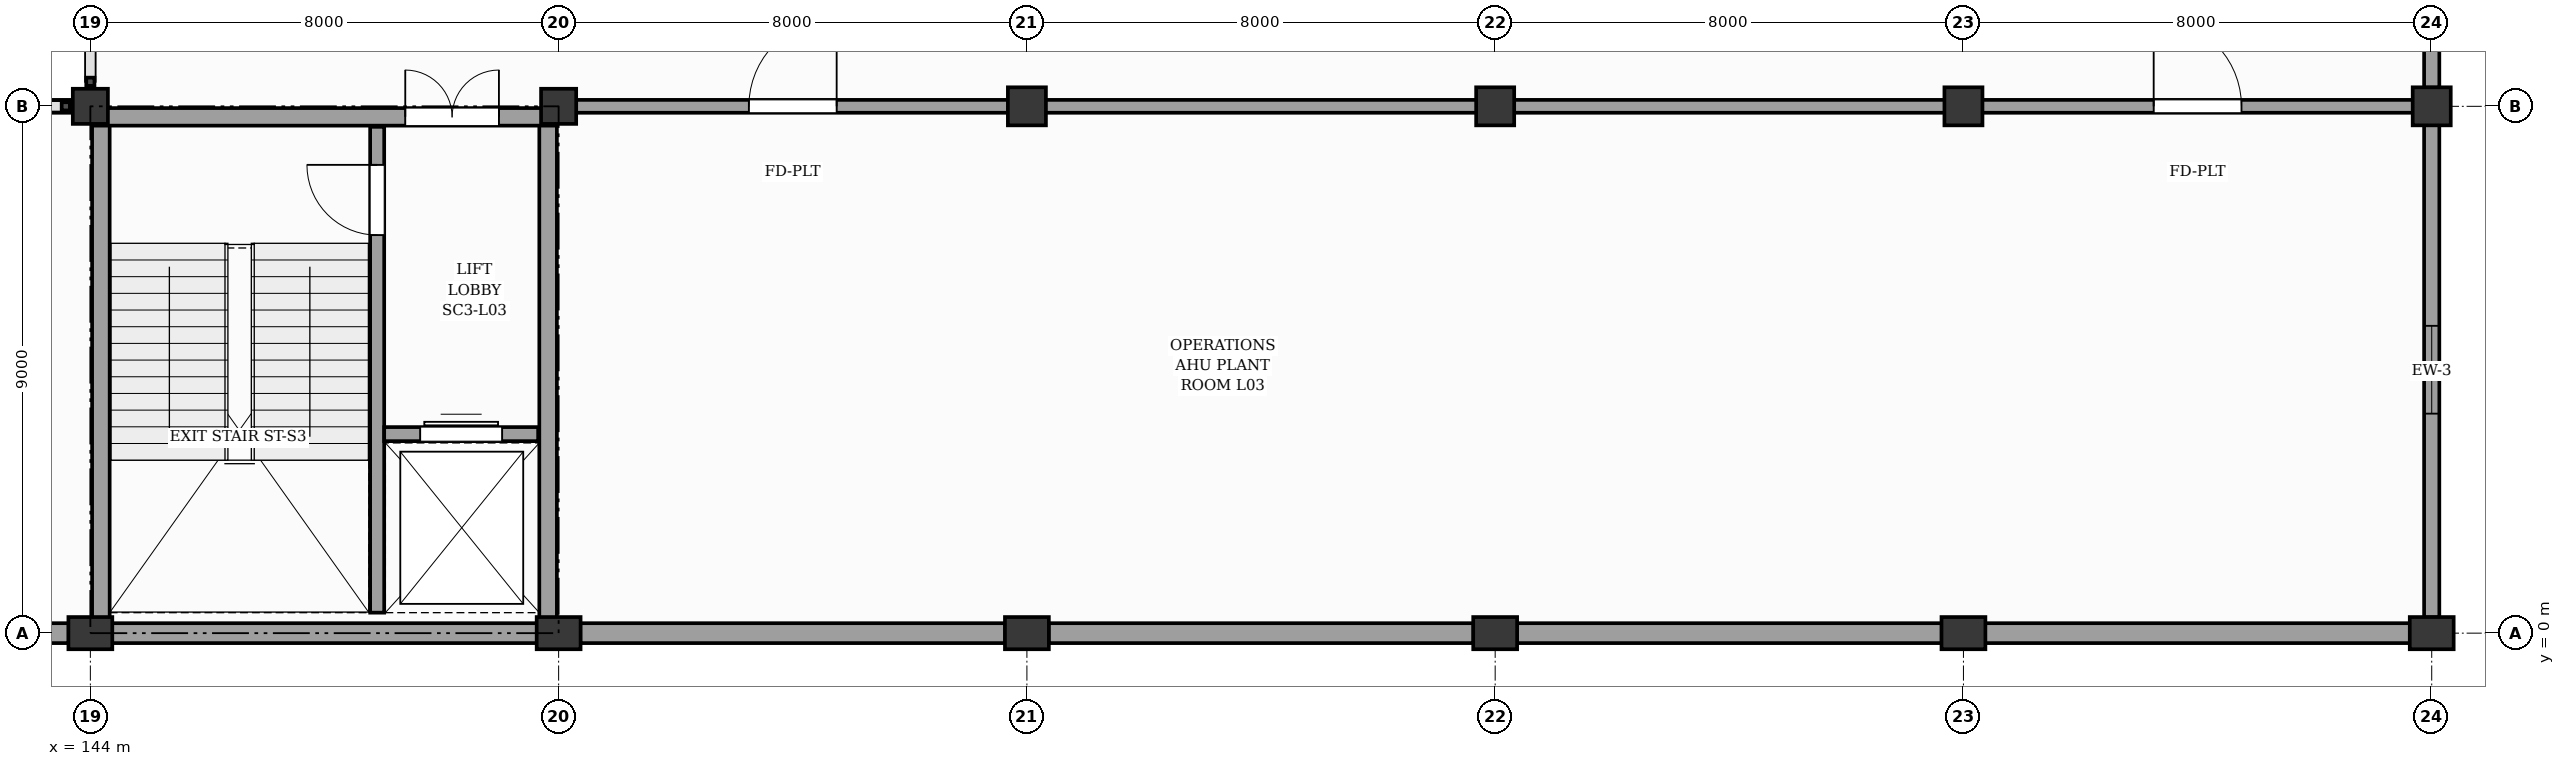
"""IFC4 building model, lengths in metres.
Left out: names, types, materials, properties, quantities, classifications, styles, units other than length and angle.
Written with IfcOpenShell. Run it as: python <this file> out.ifc"""

import sys

from ifc_helpers import new_model, si_unit, direction, frame, frame_2d, origin, origin_2d, place, context, subcontext, project, spatial, rectangle, extrude, element, fill, save


model = new_model("IFC4")
c1 = context("Model", 3, precision=1e-05, world=origin(), true_north=direction((0.0, 1.0)))
c2 = subcontext(c1, "Body", "Model", "MODEL_VIEW")
j1 = project(units=[si_unit("LENGTHUNIT", "METRE"), si_unit("PLANEANGLEUNIT", "RADIAN")], contexts=[c1])
p1 = place(None, origin())
s1 = spatial("IfcSite", under=j1, at=p1, CompositionType="ELEMENT")
p2 = place(p1, origin())
s2 = spatial("IfcBuilding", under=s1, at=p2, CompositionType="ELEMENT")
p3 = place(p2, frame((0.0, 0.0, 16.2)))
s3 = spatial("IfcBuildingStorey", under=s2, at=p3, CompositionType="ELEMENT", Elevation=16.2)
p4 = place(p3, frame((144.0, 0.0, 0.0), z_axis=(0.0, 0.0, 1.0), x_axis=(1.0, 0.0, 0.0)))
e1 = element("IfcColumn", 1, at=p4, inside=s3, PredefinedType="PILASTER", context=c2, shape_type="SweptSolid", body=[
    extrude(rectangle(XDim=0.75, YDim=0.55, at=origin_2d()), origin(), (0.0, 0.0, 1.0), 4.2),
])
p5 = place(p3, frame((144.0, 9.0, 0.0), z_axis=(0.0, 0.0, 1.0), x_axis=(1.0, 0.0, 0.0)))
e2 = element("IfcColumn", 2, at=p5, inside=s3, PredefinedType="COLUMN", context=c2, shape_type="SweptSolid", body=[
    extrude(rectangle(XDim=0.6, YDim=0.6, at=origin_2d()), origin(), (0.0, 0.0, 1.0), 4.2),
])
p6 = place(p3, frame((152.0, 0.0, 0.0), z_axis=(0.0, 0.0, 1.0), x_axis=(1.0, 0.0, 0.0)))
e3 = element("IfcColumn", 3, at=p6, inside=s3, PredefinedType="PILASTER", context=c2, shape_type="SweptSolid", body=[
    extrude(rectangle(XDim=0.75, YDim=0.55, at=origin_2d()), origin(), (0.0, 0.0, 1.0), 4.2),
])
p7 = place(p3, frame((152.0, 9.0, 0.0), z_axis=(0.0, 0.0, 1.0), x_axis=(1.0, 0.0, 0.0)))
e4 = element("IfcColumn", 4, at=p7, inside=s3, PredefinedType="COLUMN", context=c2, shape_type="SweptSolid", body=[
    extrude(rectangle(XDim=0.6, YDim=0.6, at=origin_2d()), origin(), (0.0, 0.0, 1.0), 4.2),
])
p8 = place(p3, frame((160.0, 0.0, 0.0), z_axis=(0.0, 0.0, 1.0), x_axis=(1.0, 0.0, 0.0)))
e5 = element("IfcColumn", 5, at=p8, inside=s3, PredefinedType="PILASTER", context=c2, shape_type="SweptSolid", body=[
    extrude(rectangle(XDim=0.75, YDim=0.55, at=origin_2d()), origin(), (0.0, 0.0, 1.0), 4.2),
])
p9 = place(p3, frame((160.0, 9.0, 0.0), z_axis=(0.0, 0.0, 1.0), x_axis=(1.0, 0.0, 0.0)))
e6 = element("IfcColumn", 6, at=p9, inside=s3, PredefinedType="COLUMN", context=c2, shape_type="SweptSolid", body=[
    extrude(rectangle(XDim=0.65, YDim=0.65, at=origin_2d()), origin(), (0.0, 0.0, 1.0), 4.2),
])
p10 = place(p3, frame((168.0, 0.0, 0.0), z_axis=(0.0, 0.0, 1.0), x_axis=(1.0, 0.0, 0.0)))
e7 = element("IfcColumn", 7, at=p10, inside=s3, PredefinedType="PILASTER", context=c2, shape_type="SweptSolid", body=[
    extrude(rectangle(XDim=0.75, YDim=0.55, at=origin_2d()), origin(), (0.0, 0.0, 1.0), 4.2),
])
p11 = place(p3, frame((168.0, 9.0, 0.0), z_axis=(0.0, 0.0, 1.0), x_axis=(1.0, 0.0, 0.0)))
e8 = element("IfcColumn", 8, at=p11, inside=s3, PredefinedType="COLUMN", context=c2, shape_type="SweptSolid", body=[
    extrude(rectangle(XDim=0.65, YDim=0.65, at=origin_2d()), origin(), (0.0, 0.0, 1.0), 4.2),
])
p12 = place(p3, frame((176.0, 0.0, 0.0), z_axis=(0.0, 0.0, 1.0), x_axis=(1.0, 0.0, 0.0)))
e9 = element("IfcColumn", 9, at=p12, inside=s3, PredefinedType="PILASTER", context=c2, shape_type="SweptSolid", body=[
    extrude(rectangle(XDim=0.75, YDim=0.55, at=origin_2d()), origin(), (0.0, 0.0, 1.0), 4.2),
])
p13 = place(p3, frame((176.0, 9.0, 0.0), z_axis=(0.0, 0.0, 1.0), x_axis=(1.0, 0.0, 0.0)))
e10 = element("IfcColumn", 10, at=p13, inside=s3, PredefinedType="COLUMN", context=c2, shape_type="SweptSolid", body=[
    extrude(rectangle(XDim=0.65, YDim=0.65, at=origin_2d()), origin(), (0.0, 0.0, 1.0), 4.2),
])
p14 = place(p3, frame((184.0, 0.0, 0.0), z_axis=(0.0, 0.0, 1.0), x_axis=(1.0, 0.0, 0.0)))
e11 = element("IfcColumn", 11, at=p14, inside=s3, PredefinedType="PILASTER", context=c2, shape_type="SweptSolid", body=[
    extrude(rectangle(XDim=0.75, YDim=0.55, at=origin_2d()), origin(), (0.0, 0.0, 1.0), 4.2),
])
p15 = place(p3, frame((184.0, 9.0, 0.0), z_axis=(0.0, 0.0, 1.0), x_axis=(1.0, 0.0, 0.0)))
e12 = element("IfcColumn", 12, at=p15, inside=s3, PredefinedType="COLUMN", context=c2, shape_type="SweptSolid", body=[
    extrude(rectangle(XDim=0.65, YDim=0.65, at=origin_2d()), origin(), (0.0, 0.0, 1.0), 4.2),
])
for number, where, z_axis, x_axis in (
    (13, (136.37, 0.0, 0.0), (0.0, 0.0, 1.0), (1.0, 0.0, 0.0)),
    (14, (144.37, 0.0, 0.0), (0.0, 0.0, 1.0), (1.0, 0.0, 0.0)),
    (15, (152.37, 0.0, 0.0), (0.0, 0.0, 1.0), (1.0, 0.0, 0.0)),
    (16, (160.37, 0.0, 0.0), (0.0, 0.0, 1.0), (1.0, 0.0, 0.0)),
    (17, (168.37, 0.0, 0.0), (0.0, 0.0, 1.0), (1.0, 0.0, 0.0)),
    (18, (176.37, 0.0, 0.0), (0.0, 0.0, 1.0), (1.0, 0.0, 0.0)),
):
    element("IfcWall", number, at=place(p3, frame(where, z_axis=z_axis, x_axis=x_axis)), inside=s3, PredefinedType="SOLIDWALL", context=c2, shape_type="SweptSolid", body=[
        extrude(rectangle(XDim=7.26, YDim=0.34, at=frame_2d((3.63, 0.0))), origin(), (0.0, 0.0, 1.0), 3.24),
    ])
p16 = place(p3, frame((184.0, 0.27, 0.0), z_axis=(0.0, 0.0, 1.0), x_axis=(0.0, 1.0, 0.0)))
e19 = element("IfcWall", 19, at=p16, inside=s3, PredefinedType="SOLIDWALL", context=c2, shape_type="SweptSolid", body=[
    extrude(rectangle(XDim=8.41, YDim=0.26, at=frame_2d((4.205, 0.0))), origin(), (0.0, 0.0, 1.0), 3.13),
])
p17 = place(p16, frame((3.48, 0.0, 0.95)))
e20 = element("IfcOpeningElement", 20, at=p17, cuts=e19, PredefinedType="OPENING", context=c2, shape_type="SweptSolid", body=[
    extrude(rectangle(XDim=1.5, YDim=1.9, at=frame_2d((0.75, 0.95))), frame((0.0, 0.14, 0.0), z_axis=(0.0, -1.0, 0.0), x_axis=(1.0, 0.0, 0.0)), (0.0, 0.0, 1.0), 0.28),
])
p18 = place(p3, frame((184.0, 9.32, 0.0), z_axis=(0.0, 0.0, 1.0), x_axis=(0.0, 1.0, 0.0)))
e21 = element("IfcWall", 21, at=p18, inside=s3, PredefinedType="SOLIDWALL", context=c2, shape_type="SweptSolid", body=[
    extrude(rectangle(XDim=8.36, YDim=0.26, at=frame_2d((4.18, 0.0))), origin(), (0.0, 0.0, 1.0), 3.13),
])
p19 = place(p18, frame((3.43, 0.0, 0.95)))
e22 = element("IfcOpeningElement", 22, at=p19, cuts=e21, PredefinedType="OPENING", context=c2, shape_type="SweptSolid", body=[
    extrude(rectangle(XDim=1.5, YDim=1.9, at=frame_2d((0.75, 0.95))), frame((0.0, 0.14, 0.0), z_axis=(0.0, -1.0, 0.0), x_axis=(1.0, 0.0, 0.0)), (0.0, 0.0, 1.0), 0.28),
])
p20 = place(p3, frame((148.9, 0.35, 0.0), z_axis=(0.0, 0.0, 1.0), x_axis=(0.0, 1.0, 0.0)))
e23 = element("IfcWall", 23, at=p20, inside=s3, PredefinedType="SHEAR", context=c2, shape_type="SweptSolid", body=[
    extrude(rectangle(XDim=8.3, YDim=0.24, at=frame_2d((4.15, 0.0))), origin(), (0.0, 0.0, 1.0), 3.92),
])
p21 = place(p20, frame((6.45, 0.0, 0.0)))
e24 = element("IfcOpeningElement", 24, at=p21, cuts=e23, PredefinedType="OPENING", context=c2, shape_type="SweptSolid", body=[
    extrude(rectangle(XDim=1.2, YDim=2.15, at=frame_2d((0.6, 1.075))), frame((0.0, 0.13, 0.0), z_axis=(0.0, -1.0, 0.0), x_axis=(1.0, 0.0, 0.0)), (0.0, 0.0, 1.0), 0.26),
])
p22 = place(p3, frame((149.02, 3.4, 0.0), z_axis=(0.0, 0.0, 1.0), x_axis=(1.0, 0.0, 0.0)))
e25 = element("IfcWall", 25, at=p22, inside=s3, PredefinedType="SHEAR", context=c2, shape_type="SweptSolid", body=[
    extrude(rectangle(XDim=2.63, YDim=0.24, at=frame_2d((1.315, 0.0))), origin(), (0.0, 0.0, 1.0), 3.92),
])
p23 = place(p22, frame((0.615, 0.0, 0.0)))
e26 = element("IfcOpeningElement", 26, at=p23, cuts=e25, PredefinedType="OPENING", context=c2, shape_type="SweptSolid", body=[
    extrude(rectangle(XDim=1.4, YDim=2.15, at=frame_2d((0.7, 1.075))), frame((0.0, 0.13, 0.0), z_axis=(0.0, -1.0, 0.0), x_axis=(1.0, 0.0, 0.0)), (0.0, 0.0, 1.0), 0.26),
])
for number, where, z_axis, x_axis in (
    (27, (144.18, 0.18, 0.0), (0.0, 0.0, 1.0), (0.0, 1.0, 0.0)),
    (28, (151.82, 0.18, 0.0), (0.0, 0.0, 1.0), (0.0, 1.0, 0.0)),
):
    element("IfcWall", number, at=place(p3, frame(where, z_axis=z_axis, x_axis=x_axis)), inside=s3, PredefinedType="SHEAR", context=c2, shape_type="SweptSolid", body=[
        extrude(rectangle(XDim=8.64, YDim=0.3, at=frame_2d((4.32, 0.0))), origin(), (0.0, 0.0, 1.0), 3.92),
    ])
p24 = place(p3, frame((144.03, 8.82, 0.0), z_axis=(0.0, 0.0, 1.0), x_axis=(1.0, 0.0, 0.0)))
e29 = element("IfcWall", 29, at=p24, inside=s3, PredefinedType="SHEAR", context=c2, shape_type="SweptSolid", body=[
    extrude(rectangle(XDim=7.94, YDim=0.3, at=frame_2d((3.97, 0.0))), origin(), (0.0, 0.0, 1.0), 3.92),
])
p25 = place(p24, frame((5.35, 0.0, 0.0)))
e30 = element("IfcOpeningElement", 30, at=p25, cuts=e29, PredefinedType="OPENING", context=c2, shape_type="SweptSolid", body=[
    extrude(rectangle(XDim=1.6, YDim=2.15, at=frame_2d((0.8, 1.075))), frame((0.0, 0.16, 0.0), z_axis=(0.0, -1.0, 0.0), x_axis=(1.0, 0.0, 0.0)), (0.0, 0.0, 1.0), 0.32),
])
p26 = place(p3, frame((136.3, 9.0, 0.0), z_axis=(0.0, 0.0, 1.0), x_axis=(1.0, 0.0, 0.0)))
e31 = element("IfcWall", 31, at=p26, inside=s3, PredefinedType="SOLIDWALL", context=c2, shape_type="SweptSolid", body=[
    extrude(rectangle(XDim=7.4, YDim=0.22, at=frame_2d((3.7, 0.0))), origin(), (0.0, 0.0, 1.0), 3.1),
])
p27 = place(p3, frame((152.3, 9.0, 0.0), z_axis=(0.0, 0.0, 1.0), x_axis=(1.0, 0.0, 0.0)))
e32 = element("IfcWall", 32, at=p27, inside=s3, PredefinedType="SOLIDWALL", context=c2, shape_type="SweptSolid", body=[
    extrude(rectangle(XDim=7.4, YDim=0.22, at=frame_2d((3.7, 0.0))), origin(), (0.0, 0.0, 1.0), 3.1),
])
p28 = place(p27, frame((2.95, 0.0, 0.0)))
e33 = element("IfcOpeningElement", 33, at=p28, cuts=e32, PredefinedType="OPENING", context=c2, shape_type="SweptSolid", body=[
    extrude(rectangle(XDim=1.5, YDim=2.2, at=frame_2d((0.75, 1.1))), frame((0.0, 0.12, 0.0), z_axis=(0.0, -1.0, 0.0), x_axis=(1.0, 0.0, 0.0)), (0.0, 0.0, 1.0), 0.24),
])
for number, where, z_axis, x_axis in (
    (34, (160.3, 9.0, 0.0), (0.0, 0.0, 1.0), (1.0, 0.0, 0.0)),
    (35, (168.3, 9.0, 0.0), (0.0, 0.0, 1.0), (1.0, 0.0, 0.0)),
):
    element("IfcWall", number, at=place(p3, frame(where, z_axis=z_axis, x_axis=x_axis)), inside=s3, PredefinedType="SOLIDWALL", context=c2, shape_type="SweptSolid", body=[
        extrude(rectangle(XDim=7.4, YDim=0.22, at=frame_2d((3.7, 0.0))), origin(), (0.0, 0.0, 1.0), 3.1),
    ])
p29 = place(p3, frame((176.3, 9.0, 0.0), z_axis=(0.0, 0.0, 1.0), x_axis=(1.0, 0.0, 0.0)))
e36 = element("IfcWall", 36, at=p29, inside=s3, PredefinedType="SOLIDWALL", context=c2, shape_type="SweptSolid", body=[
    extrude(rectangle(XDim=7.4, YDim=0.22, at=frame_2d((3.7, 0.0))), origin(), (0.0, 0.0, 1.0), 3.1),
])
p30 = place(p29, frame((2.95, 0.0, 0.0)))
e37 = element("IfcOpeningElement", 37, at=p30, cuts=e36, PredefinedType="OPENING", context=c2, shape_type="SweptSolid", body=[
    extrude(rectangle(XDim=1.5, YDim=2.2, at=frame_2d((0.75, 1.1))), frame((0.0, 0.12, 0.0), z_axis=(0.0, -1.0, 0.0), x_axis=(1.0, 0.0, 0.0)), (0.0, 0.0, 1.0), 0.24),
])
p31 = place(p17, origin())
e38 = element("IfcWindow", 38, at=p31, inside=s3, PartitioningType="SINGLE_PANEL", PredefinedType="WINDOW", context=c2, shape_type="SweptSolid", body=[
    extrude(rectangle(XDim=1.5, YDim=1.9, at=frame_2d((0.75, 0.95))), frame((0.0, 0.03, 0.0), z_axis=(0.0, -1.0, 0.0), x_axis=(1.0, 0.0, 0.0)), (0.0, 0.0, 1.0), 0.06),
])
fill(e20, e38)
p32 = place(p21, origin())
e39 = element("IfcDoor", 39, at=p32, inside=s3, OperationType="SINGLE_SWING_RIGHT", PredefinedType="DOOR", context=c2, shape_type="SweptSolid", body=[
    extrude(rectangle(XDim=1.2, YDim=2.15, at=frame_2d((0.6, 1.075))), frame((0.0, 0.025, 0.0), z_axis=(0.0, -1.0, 0.0), x_axis=(1.0, 0.0, 0.0)), (0.0, 0.0, 1.0), 0.05),
])
fill(e24, e39)
p33 = place(p23, origin())
e40 = element("IfcDoor", 40, at=p33, inside=s3, OperationType="DOUBLE_DOOR_SLIDING", PredefinedType="DOOR", context=c2, shape_type="SweptSolid", body=[
    extrude(rectangle(XDim=1.4, YDim=2.15, at=frame_2d((0.7, 1.075))), frame((0.0, 0.025, 0.0), z_axis=(0.0, -1.0, 0.0), x_axis=(1.0, 0.0, 0.0)), (0.0, 0.0, 1.0), 0.05),
])
fill(e26, e40)
p34 = place(p25, origin())
e41 = element("IfcDoor", 41, at=p34, inside=s3, OperationType="DOUBLE_DOOR_SINGLE_SWING", PredefinedType="DOOR", context=c2, shape_type="SweptSolid", body=[
    extrude(rectangle(XDim=1.6, YDim=2.15, at=frame_2d((0.8, 1.075))), frame((0.0, 0.025, 0.0), z_axis=(0.0, -1.0, 0.0), x_axis=(1.0, 0.0, 0.0)), (0.0, 0.0, 1.0), 0.05),
])
fill(e30, e41)
p35 = place(p28, origin())
e42 = element("IfcDoor", 42, at=p35, inside=s3, OperationType="SINGLE_SWING_RIGHT", PredefinedType="DOOR", context=c2, shape_type="SweptSolid", body=[
    extrude(rectangle(XDim=1.5, YDim=2.2, at=frame_2d((0.75, 1.1))), frame((0.0, 0.025, 0.0), z_axis=(0.0, -1.0, 0.0), x_axis=(1.0, 0.0, 0.0)), (0.0, 0.0, 1.0), 0.05),
])
fill(e33, e42)
p36 = place(p30, origin())
e43 = element("IfcDoor", 43, at=p36, inside=s3, OperationType="SINGLE_SWING_LEFT", PredefinedType="DOOR", context=c2, shape_type="SweptSolid", body=[
    extrude(rectangle(XDim=1.5, YDim=2.2, at=frame_2d((0.75, 1.1))), frame((0.0, 0.025, 0.0), z_axis=(0.0, -1.0, 0.0), x_axis=(1.0, 0.0, 0.0)), (0.0, 0.0, 1.0), 0.05),
])
fill(e37, e43)
save(model, sys.argv[1])
